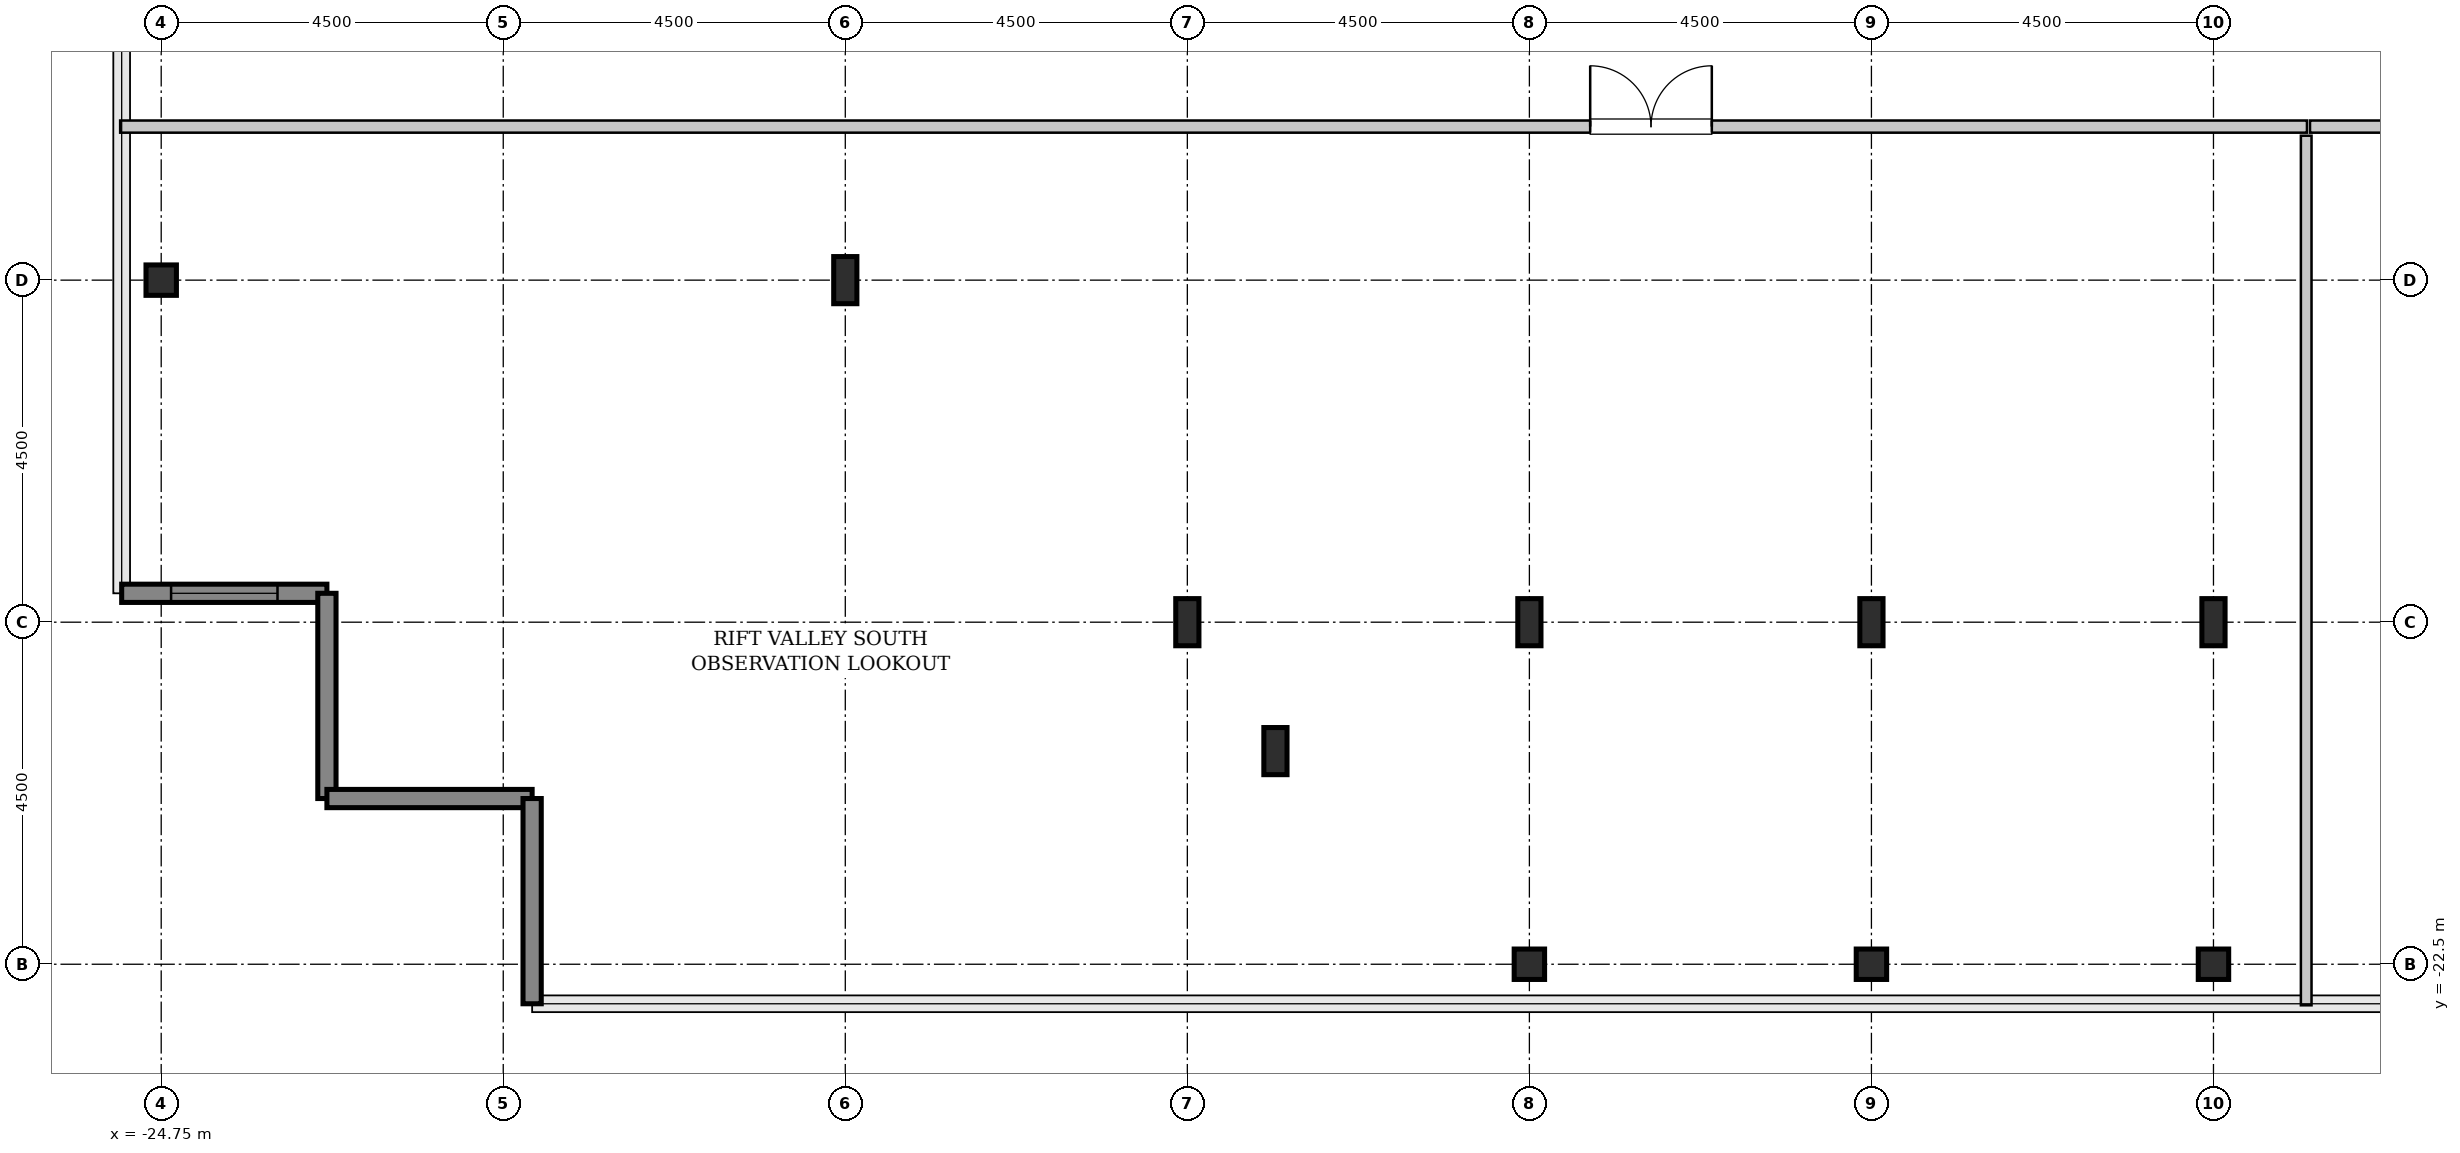
"""IFC4 building model, lengths in metres.
Left out: names, types, materials, properties, quantities, classifications, styles, units other than length and angle.
Written with IfcOpenShell. Run it as: python <this file> out.ifc"""

import sys

from ifc_helpers import new_model, si_unit, direction, frame, frame_2d, origin, origin_2d, place, context, subcontext, project, spatial, rectangle, hollow_rectangle, i_section, extrude, source, transform, mapped, element, fill, save


model = new_model("IFC4")
c1 = context("Model", 3, precision=1e-05, world=origin(), true_north=direction((0.0, 1.0)))
c2 = subcontext(c1, "Body", "Model", "MODEL_VIEW")
j1 = project(units=[si_unit("LENGTHUNIT", "METRE"), si_unit("PLANEANGLEUNIT", "RADIAN")], contexts=[c1])
p1 = place(None, origin())
s1 = spatial("IfcSite", under=j1, at=p1, CompositionType="ELEMENT")
p2 = place(p1, origin())
s2 = spatial("IfcBuilding", under=s1, at=p2, CompositionType="ELEMENT")
p3 = place(p2, frame((0.0, 0.0, 349.0)))
s3 = spatial("IfcBuildingStorey", under=s2, at=p3, CompositionType="ELEMENT", Elevation=349.0)
m1 = source(origin(), c2, "Body", "SweptSolid", [
    extrude(hollow_rectangle(XDim=0.4, YDim=0.4, WallThickness=0.02, InnerFilletRadius=0.02, OuterFilletRadius=0.04, at=origin_2d()), origin(), (0.0, 0.0, 1.0), 4.8),
])
p4 = place(p3, frame((-24.75, -13.5, 0.0), z_axis=(0.0, 0.0, 1.0), x_axis=(1.0, 0.0, 0.0)))
e1 = element("IfcColumn", 1, at=p4, inside=s3, PredefinedType="COLUMN", context=c2, shape_type="MappedRepresentation", body=[
    mapped(m1, transform((0.0, 0.0, 0.0), x_axis=(1.0, 0.0, 0.0), y_axis=(0.0, 1.0, 0.0), z_axis=(0.0, 0.0, 1.0), scale=1.0)),
])
m2 = source(origin(), c2, "Body", "SweptSolid", [
    extrude(i_section(OverallWidth=0.305, OverallDepth=0.62, WebThickness=0.021, FlangeThickness=0.04, FilletRadius=0.027, at=origin_2d()), origin(), (0.0, 0.0, 1.0), 4.8),
])
for number, where, z_axis, x_axis in (
    (2, (-15.75, -13.5, 0.0), (0.0, 0.0, 1.0), (1.0, 0.0, 0.0)),
    (3, (-11.25, -18.0, 0.0), (0.0, 0.0, 1.0), (1.0, 0.0, 0.0)),
    (4, (-10.091, -19.696, 0.0), (0.0, 0.0, 1.0), (1.0, 0.0, 0.0)),
):
    element("IfcColumn", number, at=place(p3, frame(where, z_axis=z_axis, x_axis=x_axis)), inside=s3, PredefinedType="COLUMN", context=c2, shape_type="MappedRepresentation", body=[
        mapped(m2, transform((0.0, 0.0, 0.0), x_axis=(1.0, 0.0, 0.0), y_axis=(0.0, 1.0, 0.0), z_axis=(0.0, 0.0, 1.0), scale=1.0)),
    ])
p5 = place(p3, frame((-6.75, -22.5, 0.0), z_axis=(0.0, 0.0, 1.0), x_axis=(1.0, 0.0, 0.0)))
e5 = element("IfcColumn", 5, at=p5, inside=s3, PredefinedType="COLUMN", context=c2, shape_type="MappedRepresentation", body=[
    mapped(m1, transform((0.0, 0.0, 0.0), x_axis=(1.0, 0.0, 0.0), y_axis=(0.0, 1.0, 0.0), z_axis=(0.0, 0.0, 1.0), scale=1.0)),
])
p6 = place(p3, frame((-6.75, -18.0, 0.0), z_axis=(0.0, 0.0, 1.0), x_axis=(1.0, 0.0, 0.0)))
e6 = element("IfcColumn", 6, at=p6, inside=s3, PredefinedType="COLUMN", context=c2, shape_type="MappedRepresentation", body=[
    mapped(m2, transform((0.0, 0.0, 0.0), x_axis=(1.0, 0.0, 0.0), y_axis=(0.0, 1.0, 0.0), z_axis=(0.0, 0.0, 1.0), scale=1.0)),
])
p7 = place(p3, frame((-2.25, -22.5, 0.0), z_axis=(0.0, 0.0, 1.0), x_axis=(1.0, 0.0, 0.0)))
e7 = element("IfcColumn", 7, at=p7, inside=s3, PredefinedType="COLUMN", context=c2, shape_type="MappedRepresentation", body=[
    mapped(m1, transform((0.0, 0.0, 0.0), x_axis=(1.0, 0.0, 0.0), y_axis=(0.0, 1.0, 0.0), z_axis=(0.0, 0.0, 1.0), scale=1.0)),
])
p8 = place(p3, frame((-2.25, -18.0, 0.0), z_axis=(0.0, 0.0, 1.0), x_axis=(1.0, 0.0, 0.0)))
e8 = element("IfcColumn", 8, at=p8, inside=s3, PredefinedType="COLUMN", context=c2, shape_type="MappedRepresentation", body=[
    mapped(m2, transform((0.0, 0.0, 0.0), x_axis=(1.0, 0.0, 0.0), y_axis=(0.0, 1.0, 0.0), z_axis=(0.0, 0.0, 1.0), scale=1.0)),
])
p9 = place(p3, frame((2.25, -22.5, 0.0), z_axis=(0.0, 0.0, 1.0), x_axis=(1.0, 0.0, 0.0)))
e9 = element("IfcColumn", 9, at=p9, inside=s3, PredefinedType="COLUMN", context=c2, shape_type="MappedRepresentation", body=[
    mapped(m1, transform((0.0, 0.0, 0.0), x_axis=(1.0, 0.0, 0.0), y_axis=(0.0, 1.0, 0.0), z_axis=(0.0, 0.0, 1.0), scale=1.0)),
])
p10 = place(p3, frame((2.25, -18.0, 0.0), z_axis=(0.0, 0.0, 1.0), x_axis=(1.0, 0.0, 0.0)))
e10 = element("IfcColumn", 10, at=p10, inside=s3, PredefinedType="COLUMN", context=c2, shape_type="MappedRepresentation", body=[
    mapped(m2, transform((0.0, 0.0, 0.0), x_axis=(1.0, 0.0, 0.0), y_axis=(0.0, 1.0, 0.0), z_axis=(0.0, 0.0, 1.0), scale=1.0)),
])
m3 = source(origin(), c2, "Body", "SweptSolid", [
    extrude(rectangle(XDim=2.7, YDim=0.24, at=frame_2d((1.35, 0.0))), origin(), (0.0, 0.0, 1.0), 4.5),
])
p11 = place(p3, frame((-25.27, -17.62, 0.0), z_axis=(0.0, 0.0, 1.0), x_axis=(1.0, 0.0, 0.0)))
e11 = element("IfcWall", 11, at=p11, inside=s3, PredefinedType="SHEAR", context=c2, shape_type="MappedRepresentation", body=[
    mapped(m3, transform((0.0, 0.0, 0.0), x_axis=(1.0, 0.0, 0.0), y_axis=(0.0, 1.0, 0.0), z_axis=(0.0, 0.0, 1.0), scale=1.0)),
])
p12 = place(p11, frame((0.65, 0.0, 0.85)))
e12 = element("IfcOpeningElement", 12, at=p12, cuts=e11, PredefinedType="OPENING", context=c2, shape_type="SweptSolid", body=[
    extrude(rectangle(XDim=1.4, YDim=1.8, at=frame_2d((0.7, 0.9))), frame((0.0, 0.13, 0.0), z_axis=(0.0, -1.0, 0.0), x_axis=(1.0, 0.0, 0.0)), (0.0, 0.0, 1.0), 0.26),
])
for number, where, z_axis, x_axis in (
    (13, (-22.57, -17.62, 0.0), (0.0, 0.0, 1.0), (0.0, -1.0, 0.0)),
    (14, (-22.57, -20.32, 0.0), (0.0, 0.0, 1.0), (1.0, 0.0, 0.0)),
    (15, (-19.87, -20.32, 0.0), (0.0, 0.0, 1.0), (0.0, -1.0, 0.0)),
):
    element("IfcWall", number, at=place(p3, frame(where, z_axis=z_axis, x_axis=x_axis)), inside=s3, PredefinedType="SHEAR", context=c2, shape_type="MappedRepresentation", body=[
        mapped(m3, transform((0.0, 0.0, 0.0), x_axis=(1.0, 0.0, 0.0), y_axis=(0.0, 1.0, 0.0), z_axis=(0.0, 0.0, 1.0), scale=1.0)),
    ])
m4 = source(origin(), c2, "Body", "SweptSolid", [
    extrude(rectangle(XDim=28.77, YDim=0.16, at=frame_2d((14.385, 0.0))), origin(), (0.0, 0.0, 1.0), 4.485),
])
p13 = place(p3, frame((-25.29, -11.48, 0.0), z_axis=(0.0, 0.0, 1.0), x_axis=(1.0, 0.0, 0.0)))
e16 = element("IfcWall", 16, at=p13, inside=s3, PredefinedType="PARTITIONING", context=c2, shape_type="MappedRepresentation", body=[
    mapped(m4, transform((0.0, 0.0, 0.0), x_axis=(1.0, 0.0, 0.0), y_axis=(0.0, 1.0, 0.0), z_axis=(0.0, 0.0, 1.0), scale=1.0)),
])
p14 = place(p13, frame((19.34, 0.0, 0.0)))
e17 = element("IfcOpeningElement", 17, at=p14, cuts=e16, PredefinedType="OPENING", context=c2, shape_type="SweptSolid", body=[
    extrude(rectangle(XDim=1.6, YDim=2.3, at=frame_2d((0.8, 1.15))), frame((0.0, 0.09, 0.0), z_axis=(0.0, -1.0, 0.0), x_axis=(1.0, 0.0, 0.0)), (0.0, 0.0, 1.0), 0.18),
])
m5 = source(origin(), c2, "Body", "SweptSolid", [
    extrude(rectangle(XDim=11.44, YDim=0.14, at=frame_2d((5.72, 0.0))), origin(), (0.0, 0.0, 1.0), 4.485),
])
p15 = place(p3, frame((3.47, -23.04, 0.0), z_axis=(0.0, 0.0, 1.0), x_axis=(0.0, 1.0, 0.0)))
e18 = element("IfcWall", 18, at=p15, inside=s3, PredefinedType="PARTITIONING", context=c2, shape_type="MappedRepresentation", body=[
    mapped(m5, transform((0.0, 0.0, 0.0), x_axis=(1.0, 0.0, 0.0), y_axis=(0.0, 1.0, 0.0), z_axis=(0.0, 0.0, 1.0), scale=1.0)),
])
m6 = source(origin(), c2, "Body", "SweptSolid", [
    extrude(rectangle(XDim=15.02, YDim=0.16, at=frame_2d((7.51, 0.0))), origin(), (0.0, 0.0, 1.0), 4.485),
])
p16 = place(p3, frame((3.52, -11.48, 0.0), z_axis=(0.0, 0.0, 1.0), x_axis=(1.0, 0.0, 0.0)))
e19 = element("IfcWall", 19, at=p16, inside=s3, PredefinedType="PARTITIONING", context=c2, shape_type="MappedRepresentation", body=[
    mapped(m6, transform((0.0, 0.0, 0.0), x_axis=(1.0, 0.0, 0.0), y_axis=(0.0, 1.0, 0.0), z_axis=(0.0, 0.0, 1.0), scale=1.0)),
])
p17 = place(p16, frame((4.33, 0.0, 0.0)))
e20 = element("IfcOpeningElement", 20, at=p17, cuts=e19, PredefinedType="OPENING", context=c2, shape_type="SweptSolid", body=[
    extrude(rectangle(XDim=1.6, YDim=2.3, at=frame_2d((0.8, 1.15))), frame((0.0, 0.09, 0.0), z_axis=(0.0, -1.0, 0.0), x_axis=(1.0, 0.0, 0.0)), (0.0, 0.0, 1.0), 0.18),
])
m7 = source(origin(), c2, "Body", "SweptSolid", [
    extrude(rectangle(XDim=1.4, YDim=1.8, at=frame_2d((0.7, 0.9))), frame((0.0, 0.03, 0.0), z_axis=(0.0, -1.0, 0.0), x_axis=(1.0, 0.0, 0.0)), (0.0, 0.0, 1.0), 0.06),
])
p18 = place(p12, origin())
e21 = element("IfcWindow", 21, at=p18, inside=s3, PartitioningType="SINGLE_PANEL", PredefinedType="WINDOW", context=c2, shape_type="MappedRepresentation", body=[
    mapped(m7, transform((0.0, 0.0, 0.0), x_axis=(1.0, 0.0, 0.0), y_axis=(0.0, 1.0, 0.0), z_axis=(0.0, 0.0, 1.0), scale=1.0)),
])
fill(e12, e21)
m8 = source(origin(), c2, "Body", "SweptSolid", [
    extrude(rectangle(XDim=1.6, YDim=2.3, at=frame_2d((0.8, 1.15))), frame((0.0, 0.025, 0.0), z_axis=(0.0, -1.0, 0.0), x_axis=(1.0, 0.0, 0.0)), (0.0, 0.0, 1.0), 0.05),
])
p19 = place(p14, origin())
e22 = element("IfcDoor", 22, at=p19, inside=s3, OperationType="DOUBLE_DOOR_SINGLE_SWING", PredefinedType="DOOR", context=c2, shape_type="MappedRepresentation", body=[
    mapped(m8, transform((0.0, 0.0, 0.0), x_axis=(1.0, 0.0, 0.0), y_axis=(0.0, 1.0, 0.0), z_axis=(0.0, 0.0, 1.0), scale=1.0)),
])
fill(e17, e22)
save(model, sys.argv[1])
